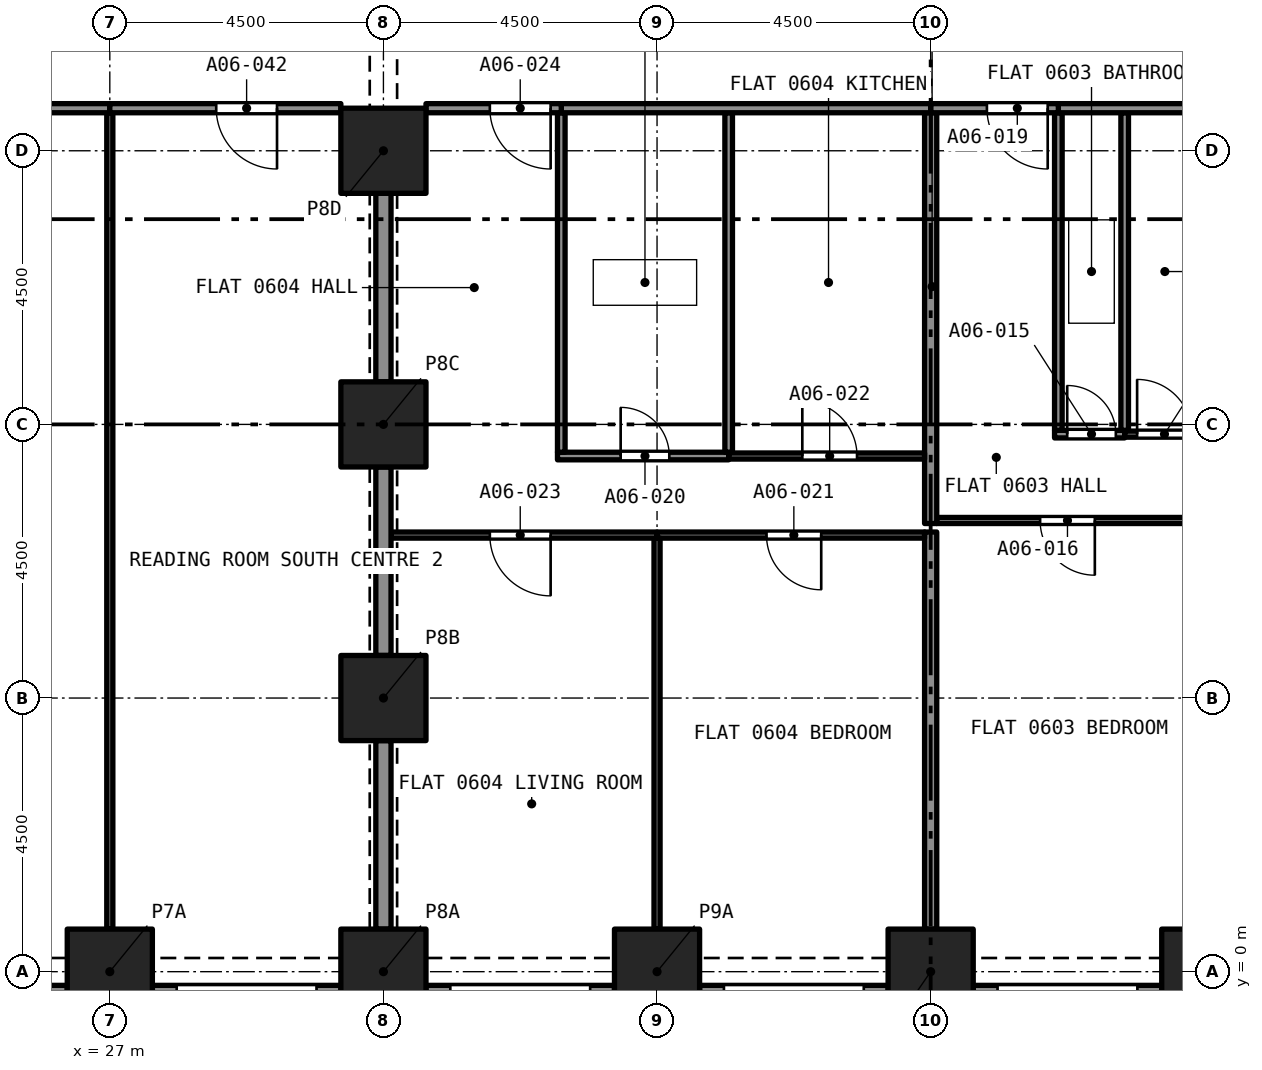
"""IFC4 building model, lengths in metres.
Left out: names, types, materials, properties, quantities, classifications, styles, units other than length and angle.
Written with IfcOpenShell. Run it as: python <this file> out.ifc"""

import sys

from ifc_helpers import new_model, si_unit, direction, frame, frame_2d, origin, origin_2d, place, context, subcontext, project, spatial, rectangle, extrude, element, fill, save


model = new_model("IFC4")
c1 = context("Model", 3, precision=1e-05, world=origin(), true_north=direction((0.0, 1.0)))
c2 = subcontext(c1, "Body", "Model", "MODEL_VIEW")
j1 = project(units=[si_unit("LENGTHUNIT", "METRE"), si_unit("PLANEANGLEUNIT", "RADIAN")], contexts=[c1])
p1 = place(None, origin())
s1 = spatial("IfcSite", under=j1, at=p1, CompositionType="ELEMENT")
p2 = place(p1, origin())
s2 = spatial("IfcBuilding", under=s1, at=p2, CompositionType="ELEMENT")
p3 = place(p2, frame((0.0, 0.0, 30.4)))
s3 = spatial("IfcBuildingStorey", under=s2, at=p3, CompositionType="ELEMENT", Elevation=30.4)
for number, where, z_axis, x_axis in (
    (1, (27.0, 0.0, 0.0), (0.0, 0.0, 1.0), (1.0, 0.0, 0.0)),
    (2, (31.5, 0.0, 0.0), (0.0, 0.0, 1.0), (1.0, 0.0, 0.0)),
    (3, (36.0, 0.0, 0.0), (0.0, 0.0, 1.0), (1.0, 0.0, 0.0)),
    (4, (40.5, 0.0, 0.0), (0.0, 0.0, 1.0), (1.0, 0.0, 0.0)),
    (5, (45.0, 0.0, 0.0), (0.0, 0.0, 1.0), (1.0, 0.0, 0.0)),
    (6, (31.5, 4.5, 0.0), (0.0, 0.0, 1.0), (1.0, 0.0, 0.0)),
    (7, (31.5, 9.0, 0.0), (0.0, 0.0, 1.0), (1.0, 0.0, 0.0)),
    (8, (31.5, 13.5, 0.0), (0.0, 0.0, 1.0), (1.0, 0.0, 0.0)),
):
    element("IfcColumn", number, at=place(p3, frame(where, z_axis=z_axis, x_axis=x_axis)), inside=s3, PredefinedType="COLUMN", context=c2, shape_type="SweptSolid", body=[
        extrude(rectangle(XDim=1.4, YDim=1.4, at=origin_2d()), origin(), (0.0, 0.0, 1.0), 3.2),
    ])
p4 = place(p3, frame((26.3, -0.375, 0.0), z_axis=(0.0, 0.0, 1.0), x_axis=(-1.0, 0.0, 0.0)))
e9 = element("IfcWall", 9, at=p4, inside=s3, PredefinedType="SOLIDWALL", context=c2, shape_type="SweptSolid", body=[
    extrude(rectangle(XDim=3.1, YDim=0.3, at=frame_2d((1.55, 0.0))), origin(), (0.0, 0.0, 1.0), 3.2),
])
p5 = place(p4, frame((0.4, 0.0, 0.45)))
e10 = element("IfcOpeningElement", 10, at=p5, cuts=e9, PredefinedType="OPENING", context=c2, shape_type="SweptSolid", body=[
    extrude(rectangle(XDim=2.3, YDim=1.95, at=frame_2d((1.15, 0.975))), frame((0.0, 0.16, 0.0), z_axis=(0.0, -1.0, 0.0), x_axis=(1.0, 0.0, 0.0)), (0.0, 0.0, 1.0), 0.32),
])
p6 = place(p3, frame((30.8, -0.375, 0.0), z_axis=(0.0, 0.0, 1.0), x_axis=(-1.0, 0.0, 0.0)))
e11 = element("IfcWall", 11, at=p6, inside=s3, PredefinedType="SOLIDWALL", context=c2, shape_type="SweptSolid", body=[
    extrude(rectangle(XDim=3.1, YDim=0.3, at=frame_2d((1.55, 0.0))), origin(), (0.0, 0.0, 1.0), 3.2),
])
p7 = place(p6, frame((0.4, 0.0, 0.45)))
e12 = element("IfcOpeningElement", 12, at=p7, cuts=e11, PredefinedType="OPENING", context=c2, shape_type="SweptSolid", body=[
    extrude(rectangle(XDim=2.3, YDim=1.95, at=frame_2d((1.15, 0.975))), frame((0.0, 0.16, 0.0), z_axis=(0.0, -1.0, 0.0), x_axis=(1.0, 0.0, 0.0)), (0.0, 0.0, 1.0), 0.32),
])
p8 = place(p3, frame((35.3, -0.375, 0.0), z_axis=(0.0, 0.0, 1.0), x_axis=(-1.0, 0.0, 0.0)))
e13 = element("IfcWall", 13, at=p8, inside=s3, PredefinedType="SOLIDWALL", context=c2, shape_type="SweptSolid", body=[
    extrude(rectangle(XDim=3.1, YDim=0.3, at=frame_2d((1.55, 0.0))), origin(), (0.0, 0.0, 1.0), 3.2),
])
p9 = place(p8, frame((0.4, 0.0, 0.45)))
e14 = element("IfcOpeningElement", 14, at=p9, cuts=e13, PredefinedType="OPENING", context=c2, shape_type="SweptSolid", body=[
    extrude(rectangle(XDim=2.3, YDim=1.95, at=frame_2d((1.15, 0.975))), frame((0.0, 0.16, 0.0), z_axis=(0.0, -1.0, 0.0), x_axis=(1.0, 0.0, 0.0)), (0.0, 0.0, 1.0), 0.32),
])
p10 = place(p3, frame((39.8, -0.375, 0.0), z_axis=(0.0, 0.0, 1.0), x_axis=(-1.0, 0.0, 0.0)))
e15 = element("IfcWall", 15, at=p10, inside=s3, PredefinedType="SOLIDWALL", context=c2, shape_type="SweptSolid", body=[
    extrude(rectangle(XDim=3.1, YDim=0.3, at=frame_2d((1.55, 0.0))), origin(), (0.0, 0.0, 1.0), 3.2),
])
p11 = place(p10, frame((0.4, 0.0, 0.45)))
e16 = element("IfcOpeningElement", 16, at=p11, cuts=e15, PredefinedType="OPENING", context=c2, shape_type="SweptSolid", body=[
    extrude(rectangle(XDim=2.3, YDim=1.95, at=frame_2d((1.15, 0.975))), frame((0.0, 0.16, 0.0), z_axis=(0.0, -1.0, 0.0), x_axis=(1.0, 0.0, 0.0)), (0.0, 0.0, 1.0), 0.32),
])
p12 = place(p3, frame((44.3, -0.375, 0.0), z_axis=(0.0, 0.0, 1.0), x_axis=(-1.0, 0.0, 0.0)))
e17 = element("IfcWall", 17, at=p12, inside=s3, PredefinedType="SOLIDWALL", context=c2, shape_type="SweptSolid", body=[
    extrude(rectangle(XDim=3.1, YDim=0.3, at=frame_2d((1.55, 0.0))), origin(), (0.0, 0.0, 1.0), 3.2),
])
p13 = place(p12, frame((0.4, 0.0, 0.45)))
e18 = element("IfcOpeningElement", 18, at=p13, cuts=e17, PredefinedType="OPENING", context=c2, shape_type="SweptSolid", body=[
    extrude(rectangle(XDim=2.3, YDim=1.95, at=frame_2d((1.15, 0.975))), frame((0.0, 0.16, 0.0), z_axis=(0.0, -1.0, 0.0), x_axis=(1.0, 0.0, 0.0)), (0.0, 0.0, 1.0), 0.32),
])
p14 = place(p3, frame((42.538, 8.84, 0.0), z_axis=(0.0, 0.0, 1.0), x_axis=(1.0, 0.0, 0.0)))
e19 = element("IfcWall", 19, at=p14, inside=s3, PredefinedType="PARTITIONING", context=c2, shape_type="SweptSolid", body=[
    extrude(rectangle(XDim=1.153, YDim=0.125, at=frame_2d((0.577, 0.0))), origin(), (0.0, 0.0, 1.0), 2.9),
])
p15 = place(p14, frame((0.208, 0.0, 0.0)))
e20 = element("IfcOpeningElement", 20, at=p15, cuts=e19, PredefinedType="OPENING", context=c2, shape_type="SweptSolid", body=[
    extrude(rectangle(XDim=0.8, YDim=2.1, at=frame_2d((0.4, 1.05))), frame((0.0, 0.073, 0.0), z_axis=(0.0, -1.0, 0.0), x_axis=(1.0, 0.0, 0.0)), (0.0, 0.0, 1.0), 0.145),
])
for number, where, z_axis, x_axis in (
    (21, (42.6, 8.903, 0.0), (0.0, 0.0, 1.0), (0.0, 1.0, 0.0)),
    (22, (43.691, 8.903, 0.0), (0.0, 0.0, 1.0), (0.0, 1.0, 0.0)),
):
    element("IfcWall", number, at=place(p3, frame(where, z_axis=z_axis, x_axis=x_axis)), inside=s3, PredefinedType="PARTITIONING", context=c2, shape_type="SweptSolid", body=[
        extrude(rectangle(XDim=5.222, YDim=0.125, at=frame_2d((2.611, 0.0))), origin(), (0.0, 0.0, 1.0), 2.9),
    ])
p16 = place(p3, frame((42.6, 14.2, 0.0), z_axis=(0.0, 0.0, 1.0), x_axis=(1.0, 0.0, 0.0)))
e23 = element("IfcWall", 23, at=p16, inside=s3, PredefinedType="PARTITIONING", context=c2, shape_type="SweptSolid", body=[
    extrude(rectangle(XDim=6.2, YDim=0.15, at=frame_2d((3.1, 0.0))), origin(), (0.0, 0.0, 1.0), 2.9),
])
p17 = place(p3, frame((44.95, 7.42, 0.0), z_axis=(0.0, 0.0, 1.0), x_axis=(-1.0, 0.0, 0.0)))
e24 = element("IfcWall", 24, at=p17, inside=s3, PredefinedType="PARTITIONING", context=c2, shape_type="SweptSolid", body=[
    extrude(rectangle(XDim=4.35, YDim=0.1, at=frame_2d((2.175, 0.0))), origin(), (0.0, 0.0, 1.0), 2.9),
])
p18 = place(p17, frame((1.75, 0.0, 0.0)))
e25 = element("IfcOpeningElement", 25, at=p18, cuts=e24, PredefinedType="OPENING", context=c2, shape_type="SweptSolid", body=[
    extrude(rectangle(XDim=0.9, YDim=2.1, at=frame_2d((0.45, 1.05))), frame((0.0, 0.06, 0.0), z_axis=(0.0, -1.0, 0.0), x_axis=(1.0, 0.0, 0.0)), (0.0, 0.0, 1.0), 0.12),
])
p19 = place(p3, frame((40.5, 0.7, 0.0), z_axis=(0.0, 0.0, 1.0), x_axis=(0.0, 1.0, 0.0)))
e26 = element("IfcWall", 26, at=p19, inside=s3, PredefinedType="PARTITIONING", context=c2, shape_type="SweptSolid", body=[
    extrude(rectangle(XDim=6.53, YDim=0.2, at=frame_2d((3.265, 0.0))), origin(), (0.0, 0.0, 1.0), 2.9),
])
p20 = place(p3, frame((43.691, 8.84, 0.0), z_axis=(0.0, 0.0, 1.0), x_axis=(1.0, 0.0, 0.0)))
e27 = element("IfcWall", 27, at=p20, inside=s3, PredefinedType="PARTITIONING", context=c2, shape_type="SweptSolid", body=[
    extrude(rectangle(XDim=1.259, YDim=0.1, at=frame_2d((0.629, 0.0))), origin(), (0.0, 0.0, 1.0), 2.9),
])
p21 = place(p20, frame((0.205, 0.0, 0.0)))
e28 = element("IfcOpeningElement", 28, at=p21, cuts=e27, PredefinedType="OPENING", context=c2, shape_type="SweptSolid", body=[
    extrude(rectangle(XDim=0.9, YDim=2.1, at=frame_2d((0.45, 1.05))), frame((0.0, 0.06, 0.0), z_axis=(0.0, -1.0, 0.0), x_axis=(1.0, 0.0, 0.0)), (0.0, 0.0, 1.0), 0.12),
])
p22 = place(p3, frame((40.5, 7.37, 0.0), z_axis=(0.0, 0.0, 1.0), x_axis=(0.0, 1.0, 0.0)))
e29 = element("IfcWall", 29, at=p22, inside=s3, PredefinedType="PARTITIONING", context=c2, shape_type="SweptSolid", body=[
    extrude(rectangle(XDim=6.755, YDim=0.2, at=frame_2d((3.377, 0.0))), origin(), (0.0, 0.0, 1.0), 2.9),
])
p23 = place(p3, frame((42.6, 14.2, 0.0), z_axis=(0.0, 0.0, 1.0), x_axis=(-1.0, 0.0, 0.0)))
e30 = element("IfcWall", 30, at=p23, inside=s3, PredefinedType="PARTITIONING", context=c2, shape_type="SweptSolid", body=[
    extrude(rectangle(XDim=2.1, YDim=0.15, at=frame_2d((1.05, 0.0))), origin(), (0.0, 0.0, 1.0), 2.9),
])
p24 = place(p23, frame((0.175, 0.0, 0.0)))
e31 = element("IfcOpeningElement", 31, at=p24, cuts=e30, PredefinedType="OPENING", context=c2, shape_type="SweptSolid", body=[
    extrude(rectangle(XDim=1.0, YDim=2.1, at=frame_2d((0.5, 1.05))), frame((0.0, 0.085, 0.0), z_axis=(0.0, -1.0, 0.0), x_axis=(1.0, 0.0, 0.0)), (0.0, 0.0, 1.0), 0.17),
])
p25 = place(p3, frame((34.363, 8.48, 0.0), z_axis=(0.0, 0.0, 1.0), x_axis=(1.0, 0.0, 0.0)))
e32 = element("IfcWall", 32, at=p25, inside=s3, PredefinedType="PARTITIONING", context=c2, shape_type="SweptSolid", body=[
    extrude(rectangle(XDim=2.816, YDim=0.125, at=frame_2d((1.408, 0.0))), origin(), (0.0, 0.0, 1.0), 2.9),
])
p26 = place(p25, frame((1.039, 0.0, 0.0)))
e33 = element("IfcOpeningElement", 33, at=p26, cuts=e32, PredefinedType="OPENING", context=c2, shape_type="SweptSolid", body=[
    extrude(rectangle(XDim=0.8, YDim=2.1, at=frame_2d((0.4, 1.05))), frame((0.0, 0.073, 0.0), z_axis=(0.0, -1.0, 0.0), x_axis=(1.0, 0.0, 0.0)), (0.0, 0.0, 1.0), 0.145),
])
for number, where, z_axis, x_axis in (
    (34, (34.425, 8.542, 0.0), (0.0, 0.0, 1.0), (0.0, 1.0, 0.0)),
    (35, (37.178, 8.542, 0.0), (0.0, 0.0, 1.0), (0.0, 1.0, 0.0)),
):
    element("IfcWall", number, at=place(p3, frame(where, z_axis=z_axis, x_axis=x_axis)), inside=s3, PredefinedType="PARTITIONING", context=c2, shape_type="SweptSolid", body=[
        extrude(rectangle(XDim=5.583, YDim=0.125, at=frame_2d((2.791, 0.0))), origin(), (0.0, 0.0, 1.0), 2.9),
    ])
p27 = place(p3, frame((34.425, 14.2, 0.0), z_axis=(0.0, 0.0, 1.0), x_axis=(1.0, 0.0, 0.0)))
e36 = element("IfcWall", 36, at=p27, inside=s3, PredefinedType="PARTITIONING", context=c2, shape_type="SweptSolid", body=[
    extrude(rectangle(XDim=6.075, YDim=0.15, at=frame_2d((3.038, 0.0))), origin(), (0.0, 0.0, 1.0), 2.9),
])
p28 = place(p3, frame((40.4, 7.18, 0.0), z_axis=(0.0, 0.0, 1.0), x_axis=(-1.0, 0.0, 0.0)))
e37 = element("IfcWall", 37, at=p28, inside=s3, PredefinedType="PARTITIONING", context=c2, shape_type="SweptSolid", body=[
    extrude(rectangle(XDim=4.4, YDim=0.1, at=frame_2d((2.2, 0.0))), origin(), (0.0, 0.0, 1.0), 2.9),
])
p29 = place(p28, frame((1.7, 0.0, 0.0)))
e38 = element("IfcOpeningElement", 38, at=p29, cuts=e37, PredefinedType="OPENING", context=c2, shape_type="SweptSolid", body=[
    extrude(rectangle(XDim=0.9, YDim=2.1, at=frame_2d((0.45, 1.05))), frame((0.0, 0.06, 0.0), z_axis=(0.0, -1.0, 0.0), x_axis=(1.0, 0.0, 0.0)), (0.0, 0.0, 1.0), 0.12),
])
p30 = place(p3, frame((36.0, 0.7, 0.0), z_axis=(0.0, 0.0, 1.0), x_axis=(0.0, 1.0, 0.0)))
e39 = element("IfcWall", 39, at=p30, inside=s3, PredefinedType="PARTITIONING", context=c2, shape_type="SweptSolid", body=[
    extrude(rectangle(XDim=6.43, YDim=0.1, at=frame_2d((3.215, 0.0))), origin(), (0.0, 0.0, 1.0), 2.9),
])
p31 = place(p3, frame((37.178, 8.48, 0.0), z_axis=(0.0, 0.0, 1.0), x_axis=(1.0, 0.0, 0.0)))
e40 = element("IfcWall", 40, at=p31, inside=s3, PredefinedType="PARTITIONING", context=c2, shape_type="SweptSolid", body=[
    extrude(rectangle(XDim=3.222, YDim=0.1, at=frame_2d((1.611, 0.0))), origin(), (0.0, 0.0, 1.0), 2.9),
])
p32 = place(p31, frame((1.211, 0.0, 0.0)))
e41 = element("IfcOpeningElement", 41, at=p32, cuts=e40, PredefinedType="OPENING", context=c2, shape_type="SweptSolid", body=[
    extrude(rectangle(XDim=0.9, YDim=2.1, at=frame_2d((0.45, 1.05))), frame((0.0, 0.06, 0.0), z_axis=(0.0, -1.0, 0.0), x_axis=(1.0, 0.0, 0.0)), (0.0, 0.0, 1.0), 0.12),
])
p33 = place(p3, frame((36.0, 7.18, 0.0), z_axis=(0.0, 0.0, 1.0), x_axis=(-1.0, 0.0, 0.0)))
e42 = element("IfcWall", 42, at=p33, inside=s3, PredefinedType="PARTITIONING", context=c2, shape_type="SweptSolid", body=[
    extrude(rectangle(XDim=4.375, YDim=0.1, at=frame_2d((2.188, 0.0))), origin(), (0.0, 0.0, 1.0), 2.9),
])
p34 = place(p33, frame((1.75, 0.0, 0.0)))
e43 = element("IfcOpeningElement", 43, at=p34, cuts=e42, PredefinedType="OPENING", context=c2, shape_type="SweptSolid", body=[
    extrude(rectangle(XDim=1.0, YDim=2.1, at=frame_2d((0.5, 1.05))), frame((0.0, 0.06, 0.0), z_axis=(0.0, -1.0, 0.0), x_axis=(1.0, 0.0, 0.0)), (0.0, 0.0, 1.0), 0.12),
])
p35 = place(p3, frame((31.5, 9.7, 0.0), z_axis=(0.0, 0.0, 1.0), x_axis=(0.0, 1.0, 0.0)))
e44 = element("IfcWall", 44, at=p35, inside=s3, PredefinedType="PARTITIONING", context=c2, shape_type="SweptSolid", body=[
    extrude(rectangle(XDim=3.1, YDim=0.25, at=frame_2d((1.55, 0.0))), origin(), (0.0, 0.0, 1.0), 2.38),
])
p36 = place(p3, frame((34.425, 14.2, 0.0), z_axis=(0.0, 0.0, 1.0), x_axis=(-1.0, 0.0, 0.0)))
e45 = element("IfcWall", 45, at=p36, inside=s3, PredefinedType="PARTITIONING", context=c2, shape_type="SweptSolid", body=[
    extrude(rectangle(XDim=2.225, YDim=0.15, at=frame_2d((1.113, 0.0))), origin(), (0.0, 0.0, 1.0), 2.9),
])
p37 = place(p36, frame((0.175, 0.0, 0.0)))
e46 = element("IfcOpeningElement", 46, at=p37, cuts=e45, PredefinedType="OPENING", context=c2, shape_type="SweptSolid", body=[
    extrude(rectangle(XDim=1.0, YDim=2.1, at=frame_2d((0.5, 1.05))), frame((0.0, 0.085, 0.0), z_axis=(0.0, -1.0, 0.0), x_axis=(1.0, 0.0, 0.0)), (0.0, 0.0, 1.0), 0.17),
])
for number, where, z_axis, x_axis in (
    (47, (31.5, 0.7, 0.0), (0.0, 0.0, 1.0), (0.0, 1.0, 0.0)),
    (48, (31.5, 5.2, 0.0), (0.0, 0.0, 1.0), (0.0, 1.0, 0.0)),
):
    element("IfcWall", number, at=place(p3, frame(where, z_axis=z_axis, x_axis=x_axis)), inside=s3, PredefinedType="PARTITIONING", context=c2, shape_type="SweptSolid", body=[
        extrude(rectangle(XDim=3.1, YDim=0.25, at=frame_2d((1.55, 0.0))), origin(), (0.0, 0.0, 1.0), 2.38),
    ])
p38 = place(p3, frame((27.0, 0.7, 0.0), z_axis=(0.0, 0.0, 1.0), x_axis=(0.0, 1.0, 0.0)))
e49 = element("IfcWall", 49, at=p38, inside=s3, PredefinedType="PARTITIONING", context=c2, shape_type="SweptSolid", body=[
    extrude(rectangle(XDim=13.425, YDim=0.1, at=frame_2d((6.712, 0.0))), origin(), (0.0, 0.0, 1.0), 2.75),
])
p39 = place(p3, frame((27.0, 14.2, 0.0), z_axis=(0.0, 0.0, 1.0), x_axis=(-1.0, 0.0, 0.0)))
e50 = element("IfcWall", 50, at=p39, inside=s3, PredefinedType="PARTITIONING", context=c2, shape_type="SweptSolid", body=[
    extrude(rectangle(XDim=4.5, YDim=0.15, at=frame_2d((2.25, 0.0))), origin(), (0.0, 0.0, 1.0), 2.75),
])
p40 = place(p39, frame((1.75, 0.0, 0.0)))
e51 = element("IfcOpeningElement", 51, at=p40, cuts=e50, PredefinedType="OPENING", context=c2, shape_type="SweptSolid", body=[
    extrude(rectangle(XDim=1.0, YDim=2.1, at=frame_2d((0.5, 1.05))), frame((0.0, 0.085, 0.0), z_axis=(0.0, -1.0, 0.0), x_axis=(1.0, 0.0, 0.0)), (0.0, 0.0, 1.0), 0.17),
])
p41 = place(p3, frame((30.8, 14.2, 0.0), z_axis=(0.0, 0.0, 1.0), x_axis=(-1.0, 0.0, 0.0)))
e52 = element("IfcWall", 52, at=p41, inside=s3, PredefinedType="PARTITIONING", context=c2, shape_type="SweptSolid", body=[
    extrude(rectangle(XDim=3.8, YDim=0.15, at=frame_2d((1.9, 0.0))), origin(), (0.0, 0.0, 1.0), 2.75),
])
p42 = place(p41, frame((1.05, 0.0, 0.0)))
e53 = element("IfcOpeningElement", 53, at=p42, cuts=e52, PredefinedType="OPENING", context=c2, shape_type="SweptSolid", body=[
    extrude(rectangle(XDim=1.0, YDim=2.1, at=frame_2d((0.5, 1.05))), frame((0.0, 0.085, 0.0), z_axis=(0.0, -1.0, 0.0), x_axis=(1.0, 0.0, 0.0)), (0.0, 0.0, 1.0), 0.17),
])
p43 = place(p15, origin())
e54 = element("IfcDoor", 54, at=p43, inside=s3, OperationType="SINGLE_SWING_RIGHT", PredefinedType="DOOR", context=c2, shape_type="SweptSolid", body=[
    extrude(rectangle(XDim=0.8, YDim=2.1, at=frame_2d((0.4, 1.05))), frame((0.0, 0.025, 0.0), z_axis=(0.0, -1.0, 0.0), x_axis=(1.0, 0.0, 0.0)), (0.0, 0.0, 1.0), 0.05),
])
fill(e20, e54)
p44 = place(p18, origin())
e55 = element("IfcDoor", 55, at=p44, inside=s3, OperationType="SINGLE_SWING_RIGHT", PredefinedType="DOOR", context=c2, shape_type="SweptSolid", body=[
    extrude(rectangle(XDim=0.9, YDim=2.1, at=frame_2d((0.45, 1.05))), frame((0.0, 0.025, 0.0), z_axis=(0.0, -1.0, 0.0), x_axis=(1.0, 0.0, 0.0)), (0.0, 0.0, 1.0), 0.05),
])
fill(e25, e55)
p45 = place(p21, origin())
e56 = element("IfcDoor", 56, at=p45, inside=s3, OperationType="SINGLE_SWING_RIGHT", PredefinedType="DOOR", context=c2, shape_type="SweptSolid", body=[
    extrude(rectangle(XDim=0.9, YDim=2.1, at=frame_2d((0.45, 1.05))), frame((0.0, 0.025, 0.0), z_axis=(0.0, -1.0, 0.0), x_axis=(1.0, 0.0, 0.0)), (0.0, 0.0, 1.0), 0.05),
])
fill(e28, e56)
p46 = place(p24, origin())
e57 = element("IfcDoor", 57, at=p46, inside=s3, OperationType="SINGLE_SWING_LEFT", PredefinedType="DOOR", context=c2, shape_type="SweptSolid", body=[
    extrude(rectangle(XDim=1.0, YDim=2.1, at=frame_2d((0.5, 1.05))), frame((0.0, 0.025, 0.0), z_axis=(0.0, -1.0, 0.0), x_axis=(1.0, 0.0, 0.0)), (0.0, 0.0, 1.0), 0.05),
])
fill(e31, e57)
p47 = place(p26, origin())
e58 = element("IfcDoor", 58, at=p47, inside=s3, OperationType="SINGLE_SWING_RIGHT", PredefinedType="DOOR", context=c2, shape_type="SweptSolid", body=[
    extrude(rectangle(XDim=0.8, YDim=2.1, at=frame_2d((0.4, 1.05))), frame((0.0, 0.025, 0.0), z_axis=(0.0, -1.0, 0.0), x_axis=(1.0, 0.0, 0.0)), (0.0, 0.0, 1.0), 0.05),
])
fill(e33, e58)
p48 = place(p29, origin())
e59 = element("IfcDoor", 59, at=p48, inside=s3, OperationType="SINGLE_SWING_LEFT", PredefinedType="DOOR", context=c2, shape_type="SweptSolid", body=[
    extrude(rectangle(XDim=0.9, YDim=2.1, at=frame_2d((0.45, 1.05))), frame((0.0, 0.025, 0.0), z_axis=(0.0, -1.0, 0.0), x_axis=(1.0, 0.0, 0.0)), (0.0, 0.0, 1.0), 0.05),
])
fill(e38, e59)
p49 = place(p32, origin())
e60 = element("IfcDoor", 60, at=p49, inside=s3, OperationType="SINGLE_SWING_RIGHT", PredefinedType="DOOR", context=c2, shape_type="SweptSolid", body=[
    extrude(rectangle(XDim=0.9, YDim=2.1, at=frame_2d((0.45, 1.05))), frame((0.0, 0.025, 0.0), z_axis=(0.0, -1.0, 0.0), x_axis=(1.0, 0.0, 0.0)), (0.0, 0.0, 1.0), 0.05),
])
fill(e41, e60)
p50 = place(p34, origin())
e61 = element("IfcDoor", 61, at=p50, inside=s3, OperationType="SINGLE_SWING_RIGHT", PredefinedType="DOOR", context=c2, shape_type="SweptSolid", body=[
    extrude(rectangle(XDim=1.0, YDim=2.1, at=frame_2d((0.5, 1.05))), frame((0.0, 0.025, 0.0), z_axis=(0.0, -1.0, 0.0), x_axis=(1.0, 0.0, 0.0)), (0.0, 0.0, 1.0), 0.05),
])
fill(e43, e61)
p51 = place(p37, origin())
e62 = element("IfcDoor", 62, at=p51, inside=s3, OperationType="SINGLE_SWING_LEFT", PredefinedType="DOOR", context=c2, shape_type="SweptSolid", body=[
    extrude(rectangle(XDim=1.0, YDim=2.1, at=frame_2d((0.5, 1.05))), frame((0.0, 0.025, 0.0), z_axis=(0.0, -1.0, 0.0), x_axis=(1.0, 0.0, 0.0)), (0.0, 0.0, 1.0), 0.05),
])
fill(e46, e62)
p52 = place(p42, origin())
e63 = element("IfcDoor", 63, at=p52, inside=s3, OperationType="SINGLE_SWING_LEFT", PredefinedType="DOOR", context=c2, shape_type="SweptSolid", body=[
    extrude(rectangle(XDim=1.0, YDim=2.1, at=frame_2d((0.5, 1.05))), frame((0.0, 0.025, 0.0), z_axis=(0.0, -1.0, 0.0), x_axis=(1.0, 0.0, 0.0)), (0.0, 0.0, 1.0), 0.05),
])
fill(e53, e63)
save(model, sys.argv[1])
